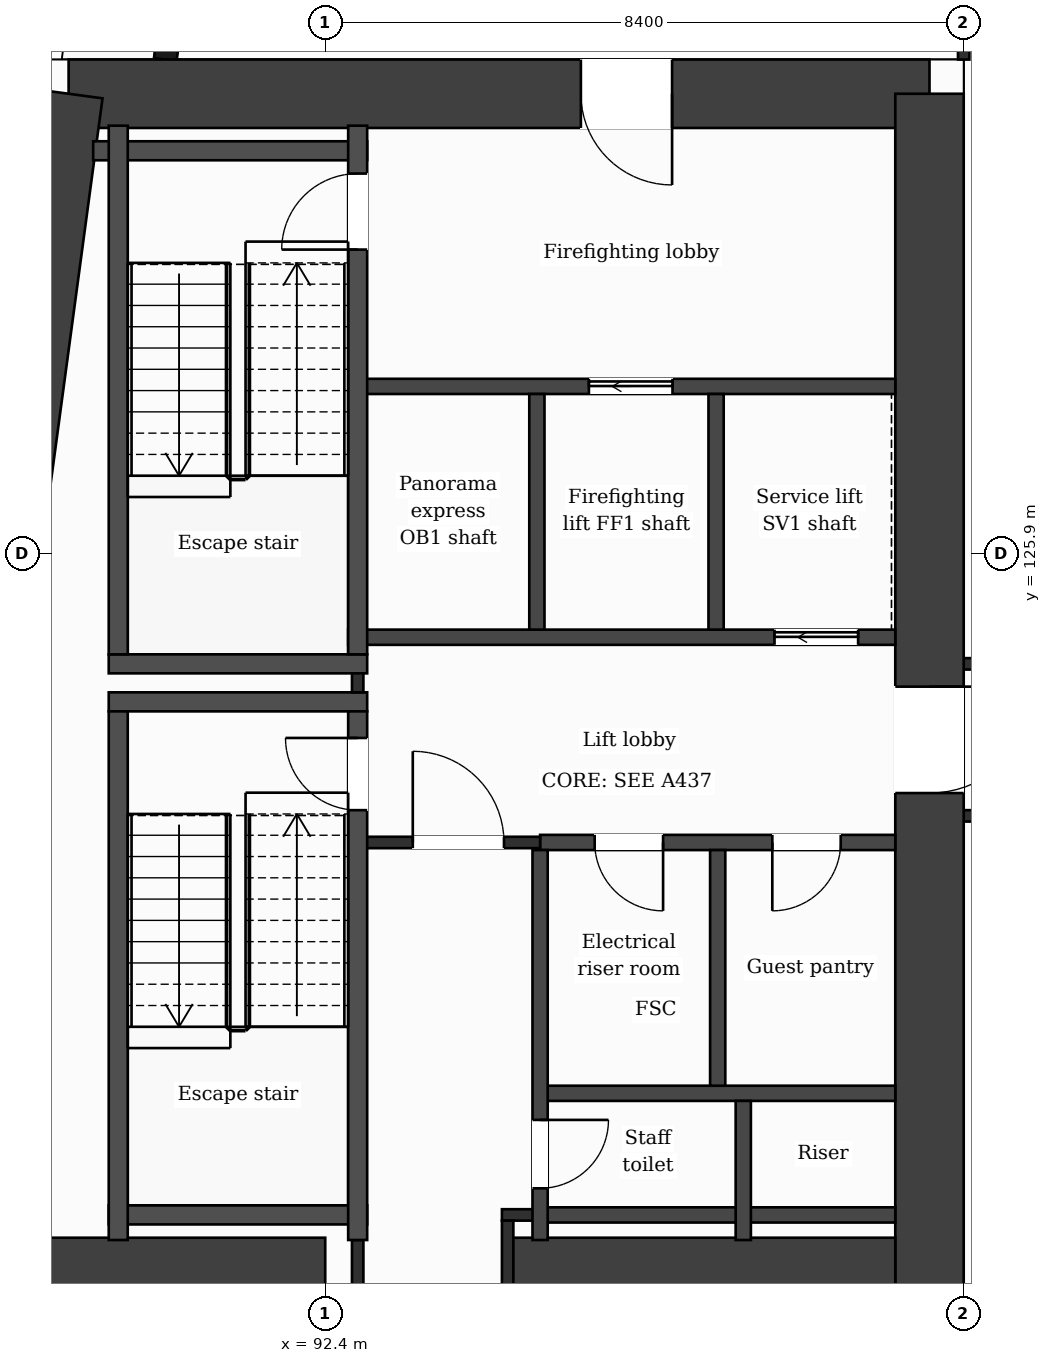
"""IFC4 building model, lengths in metres.
Left out: names, types, materials, properties, quantities, classifications, styles, units other than length and angle.
Written with IfcOpenShell. Run it as: python <this file> out.ifc"""

import sys

from ifc_helpers import new_model, si_unit, direction, frame, frame_2d, origin, place, context, subcontext, project, spatial, rectangle, extrude, element, fill, save


model = new_model("IFC4")
c1 = context("Model", 3, precision=1e-05, world=origin(), true_north=direction((0.0, 1.0)))
c2 = subcontext(c1, "Body", "Model", "MODEL_VIEW")
j1 = project(units=[si_unit("LENGTHUNIT", "METRE"), si_unit("PLANEANGLEUNIT", "RADIAN")], contexts=[c1])
p1 = place(None, origin())
s1 = spatial("IfcSite", under=j1, at=p1, CompositionType="ELEMENT")
p2 = place(p1, origin())
s2 = spatial("IfcBuilding", under=s1, at=p2, CompositionType="ELEMENT")
p3 = place(p2, frame((0.0, 0.0, 155.2)))
s3 = spatial("IfcBuildingStorey", under=s2, at=p3, CompositionType="ELEMENT", Elevation=155.2)
p4 = place(p3, frame((89.024, 131.95, 0.0), z_axis=(0.0, 0.0, 1.0), x_axis=(1.0, 0.0, 0.0)))
e1 = element("IfcWall", 1, at=p4, inside=s3, PredefinedType="SHEAR", context=c2, shape_type="SweptSolid", body=[
    extrude(rectangle(XDim=11.326, YDim=0.9, at=frame_2d((5.663, 0.0))), origin(), (0.0, 0.0, 1.0), 3.7),
])
p5 = place(p4, frame((6.739, 0.0, 0.0)))
e2 = element("IfcOpeningElement", 2, at=p5, cuts=e1, PredefinedType="OPENING", context=c2, shape_type="SweptSolid", body=[
    extrude(rectangle(XDim=1.2, YDim=2.1, at=frame_2d((0.6, 1.05))), frame((0.0, 0.46, 0.0), z_axis=(0.0, -1.0, 0.0), x_axis=(1.0, 0.0, 0.0)), (0.0, 0.0, 1.0), 0.92),
])
p6 = place(p3, frame((100.35, 131.95, 0.0), z_axis=(0.0, 0.0, 1.0), x_axis=(0.0, -1.0, 0.0)))
e3 = element("IfcWall", 3, at=p6, inside=s3, PredefinedType="SHEAR", context=c2, shape_type="SweptSolid", body=[
    extrude(rectangle(XDim=21.1, YDim=0.9, at=frame_2d((10.55, 0.0))), origin(), (0.0, 0.0, 1.0), 3.7),
])
p7 = place(p6, frame((7.8, 0.0, 0.0)))
e4 = element("IfcOpeningElement", 4, at=p7, cuts=e3, PredefinedType="OPENING", context=c2, shape_type="SweptSolid", body=[
    extrude(rectangle(XDim=1.4, YDim=2.1, at=frame_2d((0.7, 1.05))), frame((0.0, 0.46, 0.0), z_axis=(0.0, -1.0, 0.0), x_axis=(1.0, 0.0, 0.0)), (0.0, 0.0, 1.0), 0.92),
])
p8 = place(p3, frame((86.184, 110.85, 0.0), z_axis=(0.0, 0.0, 1.0), x_axis=(0.133410495943, 0.991060865725, 0.0)))
e5 = element("IfcWall", 5, at=p8, inside=s3, PredefinedType="SHEAR", context=c2, shape_type="SweptSolid", body=[
    extrude(rectangle(XDim=21.29, YDim=0.9, at=frame_2d((10.645, 0.0))), origin(), (0.0, 0.0, 1.0), 3.7),
])
p9 = place(p3, frame((87.323, 116.45, 0.0), z_axis=(0.0, 0.0, 1.0), x_axis=(1.0, 0.0, 0.0)))
e6 = element("IfcWall", 6, at=p9, inside=s3, PredefinedType="SHEAR", context=c2, shape_type="SweptSolid", body=[
    extrude(rectangle(XDim=5.077, YDim=0.9, at=frame_2d((2.539, 0.0))), origin(), (0.0, 0.0, 1.0), 3.7),
])
p10 = place(p3, frame((94.8, 116.45, 0.0), z_axis=(0.0, 0.0, 1.0), x_axis=(1.0, 0.0, 0.0)))
e7 = element("IfcWall", 7, at=p10, inside=s3, PredefinedType="SHEAR", context=c2, shape_type="SweptSolid", body=[
    extrude(rectangle(XDim=5.1, YDim=0.9, at=frame_2d((2.55, 0.0))), origin(), (0.0, 0.0, 1.0), 3.7),
])
p11 = place(p3, frame((91.177, 138.95, 0.0), z_axis=(0.0, 0.0, 1.0), x_axis=(-0.133426664613, -0.991058689065, 0.0)))
e8 = element("IfcWall", 8, at=p11, inside=s3, PredefinedType="SOLIDWALL", context=c2, shape_type="SweptSolid", body=[
    extrude(rectangle(XDim=6.609, YDim=0.3, at=frame_2d((3.305, 0.0))), origin(), (0.0, 0.0, 1.0), 3.38),
])
p12 = place(p11, frame((1.039, 0.0, 0.9)))
e9 = element("IfcOpeningElement", 9, at=p12, cuts=e8, PredefinedType="OPENING", context=c2, shape_type="SweptSolid", body=[
    extrude(rectangle(XDim=1.2, YDim=2.1, at=frame_2d((0.6, 1.05))), frame((0.0, 0.16, 0.0), z_axis=(0.0, -1.0, 0.0), x_axis=(1.0, 0.0, 0.0)), (0.0, 0.0, 1.0), 0.32),
])
p13 = place(p11, frame((4.294, 0.0, 0.0)))
e10 = element("IfcOpeningElement", 10, at=p13, cuts=e8, PredefinedType="OPENING", context=c2, shape_type="SweptSolid", body=[
    extrude(rectangle(XDim=1.2, YDim=2.4, at=frame_2d((0.6, 1.2))), frame((0.0, 0.16, 0.0), z_axis=(0.0, -1.0, 0.0), x_axis=(1.0, 0.0, 0.0)), (0.0, 0.0, 1.0), 0.32),
])
p14 = place(p3, frame((95.227, 117.2, 0.0), z_axis=(0.0, 0.0, 1.0), x_axis=(1.0, 0.0, 0.0)))
e11 = element("IfcWall", 11, at=p14, inside=s3, PredefinedType="PARTITIONING", context=c2, shape_type="SweptSolid", body=[
    extrude(rectangle(XDim=4.673, YDim=0.2, at=frame_2d((2.336, 0.0))), origin(), (0.0, 0.0, 1.0), 3.38),
])
p15 = place(p3, frame((94.725, 117.2, 0.0), z_axis=(0.0, 0.0, 1.0), x_axis=(1.0, 0.0, 0.0)))
e12 = element("IfcWall", 12, at=p15, inside=s3, PredefinedType="PARTITIONING", context=c2, shape_type="SweptSolid", body=[
    extrude(rectangle(XDim=0.502, YDim=0.15, at=frame_2d((0.251, 0.0))), origin(), (0.0, 0.0, 1.0), 3.38),
])
p16 = place(p3, frame((89.552, 117.2, 0.0), z_axis=(0.0, 0.0, 1.0), x_axis=(1.0, 0.0, 0.0)))
e13 = element("IfcWall", 13, at=p16, inside=s3, PredefinedType="PARTITIONING", context=c2, shape_type="SweptSolid", body=[
    extrude(rectangle(XDim=3.4, YDim=0.25, at=frame_2d((1.7, 0.0))), origin(), (0.0, 0.0, 1.0), 3.38),
])
p17 = place(p3, frame((95.227, 118.8, 0.0), z_axis=(0.0, 0.0, 1.0), x_axis=(1.0, 0.0, 0.0)))
e14 = element("IfcWall", 14, at=p17, inside=s3, PredefinedType="PARTITIONING", context=c2, shape_type="SweptSolid", body=[
    extrude(rectangle(XDim=4.673, YDim=0.2, at=frame_2d((2.336, 0.0))), origin(), (0.0, 0.0, 1.0), 3.38),
])
p18 = place(p3, frame((95.227, 122.1, 0.0), z_axis=(0.0, 0.0, 1.0), x_axis=(1.0, 0.0, 0.0)))
e15 = element("IfcWall", 15, at=p18, inside=s3, PredefinedType="PARTITIONING", context=c2, shape_type="SweptSolid", body=[
    extrude(rectangle(XDim=4.673, YDim=0.2, at=frame_2d((2.336, 0.0))), origin(), (0.0, 0.0, 1.0), 3.38),
])
p19 = place(p18, frame((0.718, 0.0, 0.0)))
e16 = element("IfcOpeningElement", 16, at=p19, cuts=e15, PredefinedType="OPENING", context=c2, shape_type="SweptSolid", body=[
    extrude(rectangle(XDim=0.9, YDim=2.1, at=frame_2d((0.45, 1.05))), frame((0.0, 0.11, 0.0), z_axis=(0.0, -1.0, 0.0), x_axis=(1.0, 0.0, 0.0)), (0.0, 0.0, 1.0), 0.22),
])
p20 = place(p18, frame((3.055, 0.0, 0.0)))
e17 = element("IfcOpeningElement", 17, at=p20, cuts=e15, PredefinedType="OPENING", context=c2, shape_type="SweptSolid", body=[
    extrude(rectangle(XDim=0.9, YDim=2.1, at=frame_2d((0.45, 1.05))), frame((0.0, 0.11, 0.0), z_axis=(0.0, -1.0, 0.0), x_axis=(1.0, 0.0, 0.0)), (0.0, 0.0, 1.0), 0.22),
])
p21 = place(p3, frame((92.827, 122.1, 0.0), z_axis=(0.0, 0.0, 1.0), x_axis=(1.0, 0.0, 0.0)))
e18 = element("IfcWall", 18, at=p21, inside=s3, PredefinedType="PARTITIONING", context=c2, shape_type="SweptSolid", body=[
    extrude(rectangle(XDim=2.4, YDim=0.15, at=frame_2d((1.2, 0.0))), origin(), (0.0, 0.0, 1.0), 3.38),
])
p22 = place(p21, frame((0.725, 0.0, 0.0)))
e19 = element("IfcOpeningElement", 19, at=p22, cuts=e18, PredefinedType="OPENING", context=c2, shape_type="SweptSolid", body=[
    extrude(rectangle(XDim=1.2, YDim=2.1, at=frame_2d((0.6, 1.05))), frame((0.0, 0.085, 0.0), z_axis=(0.0, -1.0, 0.0), x_axis=(1.0, 0.0, 0.0)), (0.0, 0.0, 1.0), 0.17),
])
p23 = place(p3, frame((100.8, 122.45, 0.0), z_axis=(0.0, 0.0, 1.0), x_axis=(1.0, 0.0, 0.0)))
e20 = element("IfcWall", 20, at=p23, inside=s3, PredefinedType="PARTITIONING", context=c2, shape_type="SweptSolid", body=[
    extrude(rectangle(XDim=25.2, YDim=0.15, at=frame_2d((12.6, 0.0))), origin(), (0.0, 0.0, 1.0), 3.38),
])
for number, where, z_axis, x_axis in (
    (21, (89.552, 123.95, 0.0), (0.0, 0.0, 1.0), (1.0, 0.0, 0.0)),
    (22, (89.552, 124.45, 0.0), (0.0, 0.0, 1.0), (1.0, 0.0, 0.0)),
):
    element("IfcWall", number, at=place(p3, frame(where, z_axis=z_axis, x_axis=x_axis)), inside=s3, PredefinedType="PARTITIONING", context=c2, shape_type="SweptSolid", body=[
        extrude(rectangle(XDim=3.4, YDim=0.25, at=frame_2d((1.7, 0.0))), origin(), (0.0, 0.0, 1.0), 3.38),
    ])
p24 = place(p3, frame((100.8, 124.45, 0.0), z_axis=(0.0, 0.0, 1.0), x_axis=(1.0, 0.0, 0.0)))
e23 = element("IfcWall", 23, at=p24, inside=s3, PredefinedType="PARTITIONING", context=c2, shape_type="SweptSolid", body=[
    extrude(rectangle(XDim=25.2, YDim=0.15, at=frame_2d((12.6, 0.0))), origin(), (0.0, 0.0, 1.0), 3.38),
])
p25 = place(p24, frame((3.03, 0.0, 0.0)))
e24 = element("IfcOpeningElement", 24, at=p25, cuts=e23, PredefinedType="OPENING", context=c2, shape_type="SweptSolid", body=[
    extrude(rectangle(XDim=1.0, YDim=2.1, at=frame_2d((0.5, 1.05))), frame((0.0, 0.085, 0.0), z_axis=(0.0, -1.0, 0.0), x_axis=(1.0, 0.0, 0.0)), (0.0, 0.0, 1.0), 0.17),
])
p26 = place(p24, frame((12.77, 0.0, 0.0)))
e25 = element("IfcOpeningElement", 25, at=p26, cuts=e23, PredefinedType="OPENING", context=c2, shape_type="SweptSolid", body=[
    extrude(rectangle(XDim=1.0, YDim=2.1, at=frame_2d((0.5, 1.05))), frame((0.0, 0.085, 0.0), z_axis=(0.0, -1.0, 0.0), x_axis=(1.0, 0.0, 0.0)), (0.0, 0.0, 1.0), 0.17),
])
p27 = place(p24, frame((17.67, 0.0, 0.0)))
e26 = element("IfcOpeningElement", 26, at=p27, cuts=e23, PredefinedType="OPENING", context=c2, shape_type="SweptSolid", body=[
    extrude(rectangle(XDim=1.0, YDim=2.1, at=frame_2d((0.5, 1.05))), frame((0.0, 0.085, 0.0), z_axis=(0.0, -1.0, 0.0), x_axis=(1.0, 0.0, 0.0)), (0.0, 0.0, 1.0), 0.17),
])
p28 = place(p24, frame((22.35, 0.0, 0.0)))
e27 = element("IfcOpeningElement", 27, at=p28, cuts=e23, PredefinedType="OPENING", context=c2, shape_type="SweptSolid", body=[
    extrude(rectangle(XDim=1.0, YDim=2.1, at=frame_2d((0.5, 1.05))), frame((0.0, 0.085, 0.0), z_axis=(0.0, -1.0, 0.0), x_axis=(1.0, 0.0, 0.0)), (0.0, 0.0, 1.0), 0.17),
])
p29 = place(p3, frame((92.702, 124.8, 0.0), z_axis=(0.0, 0.0, 1.0), x_axis=(1.0, 0.0, 0.0)))
e28 = element("IfcWall", 28, at=p29, inside=s3, PredefinedType="PARTITIONING", context=c2, shape_type="SweptSolid", body=[
    extrude(rectangle(XDim=7.198, YDim=0.2, at=frame_2d((3.599, 0.0))), origin(), (0.0, 0.0, 1.0), 3.38),
])
p30 = place(p29, frame((5.609, 0.0, 0.0)))
e29 = element("IfcOpeningElement", 29, at=p30, cuts=e28, PredefinedType="OPENING", context=c2, shape_type="SweptSolid", body=[
    extrude(rectangle(XDim=1.1, YDim=2.1, at=frame_2d((0.55, 1.05))), frame((0.0, 0.11, 0.0), z_axis=(0.0, -1.0, 0.0), x_axis=(1.0, 0.0, 0.0)), (0.0, 0.0, 1.0), 0.22),
])
p31 = place(p3, frame((92.827, 128.1, 0.0), z_axis=(0.0, 0.0, 1.0), x_axis=(1.0, 0.0, 0.0)))
e30 = element("IfcWall", 30, at=p31, inside=s3, PredefinedType="PARTITIONING", context=c2, shape_type="SweptSolid", body=[
    extrude(rectangle(XDim=7.073, YDim=0.2, at=frame_2d((3.537, 0.0))), origin(), (0.0, 0.0, 1.0), 3.38),
])
p32 = place(p31, frame((3.042, 0.0, 0.0)))
e31 = element("IfcOpeningElement", 31, at=p32, cuts=e30, PredefinedType="OPENING", context=c2, shape_type="SweptSolid", body=[
    extrude(rectangle(XDim=1.1, YDim=2.1, at=frame_2d((0.55, 1.05))), frame((0.0, 0.11, 0.0), z_axis=(0.0, -1.0, 0.0), x_axis=(1.0, 0.0, 0.0)), (0.0, 0.0, 1.0), 0.22),
])
p33 = place(p3, frame((89.347, 131.2, 0.0), z_axis=(0.0, 0.0, 1.0), x_axis=(1.0, 0.0, 0.0)))
e32 = element("IfcWall", 32, at=p33, inside=s3, PredefinedType="PARTITIONING", context=c2, shape_type="SweptSolid", body=[
    extrude(rectangle(XDim=3.604, YDim=0.25, at=frame_2d((1.802, 0.0))), origin(), (0.0, 0.0, 1.0), 3.38),
])
p34 = place(p3, frame((89.677, 116.87, 0.0), z_axis=(0.0, 0.0, 1.0), x_axis=(0.0, 1.0, 0.0)))
e33 = element("IfcWall", 33, at=p34, inside=s3, PredefinedType="PARTITIONING", context=c2, shape_type="SweptSolid", body=[
    extrude(rectangle(XDim=6.955, YDim=0.25, at=frame_2d((3.478, 0.0))), origin(), (0.0, 0.0, 1.0), 3.38),
])
p35 = place(p3, frame((89.677, 124.575, 0.0), z_axis=(0.0, 0.0, 1.0), x_axis=(0.0, 1.0, 0.0)))
e34 = element("IfcWall", 34, at=p35, inside=s3, PredefinedType="PARTITIONING", context=c2, shape_type="SweptSolid", body=[
    extrude(rectangle(XDim=6.955, YDim=0.25, at=frame_2d((3.478, 0.0))), origin(), (0.0, 0.0, 1.0), 3.38),
])
p36 = place(p3, frame((92.827, 116.0, 0.0), z_axis=(0.0, 0.0, 1.0), x_axis=(0.0, 1.0, 0.0)))
e35 = element("IfcWall", 35, at=p36, inside=s3, PredefinedType="PARTITIONING", context=c2, shape_type="SweptSolid", body=[
    extrude(rectangle(XDim=0.87, YDim=0.15, at=frame_2d((0.435, 0.0))), origin(), (0.0, 0.0, 1.0), 3.38),
])
p37 = place(p3, frame((92.827, 124.075, 0.0), z_axis=(0.0, 0.0, 1.0), x_axis=(0.0, 1.0, 0.0)))
e36 = element("IfcWall", 36, at=p37, inside=s3, PredefinedType="PARTITIONING", context=c2, shape_type="SweptSolid", body=[
    extrude(rectangle(XDim=0.25, YDim=0.15, at=frame_2d((0.125, 0.0))), origin(), (0.0, 0.0, 1.0), 3.38),
])
p38 = place(p3, frame((92.827, 116.87, 0.0), z_axis=(0.0, 0.0, 1.0), x_axis=(0.0, 1.0, 0.0)))
e37 = element("IfcWall", 37, at=p38, inside=s3, PredefinedType="PARTITIONING", context=c2, shape_type="SweptSolid", body=[
    extrude(rectangle(XDim=6.955, YDim=0.25, at=frame_2d((3.478, 0.0))), origin(), (0.0, 0.0, 1.0), 3.38),
])
p39 = place(p38, frame((5.655, 0.0, 0.0)))
e38 = element("IfcOpeningElement", 38, at=p39, cuts=e37, PredefinedType="OPENING", context=c2, shape_type="SweptSolid", body=[
    extrude(rectangle(XDim=0.95, YDim=2.1, at=frame_2d((0.475, 1.05))), frame((0.0, 0.135, 0.0), z_axis=(0.0, -1.0, 0.0), x_axis=(1.0, 0.0, 0.0)), (0.0, 0.0, 1.0), 0.27),
])
p40 = place(p3, frame((92.827, 124.575, 0.0), z_axis=(0.0, 0.0, 1.0), x_axis=(0.0, 1.0, 0.0)))
e39 = element("IfcWall", 39, at=p40, inside=s3, PredefinedType="PARTITIONING", context=c2, shape_type="SweptSolid", body=[
    extrude(rectangle(XDim=6.955, YDim=0.25, at=frame_2d((3.478, 0.0))), origin(), (0.0, 0.0, 1.0), 3.38),
])
p41 = place(p40, frame((5.325, 0.0, 0.0)))
e40 = element("IfcOpeningElement", 40, at=p41, cuts=e39, PredefinedType="OPENING", context=c2, shape_type="SweptSolid", body=[
    extrude(rectangle(XDim=1.0, YDim=2.1, at=frame_2d((0.5, 1.05))), frame((0.0, 0.135, 0.0), z_axis=(0.0, -1.0, 0.0), x_axis=(1.0, 0.0, 0.0)), (0.0, 0.0, 1.0), 0.27),
])
p42 = place(p3, frame((94.8, 116.0, 0.0), z_axis=(0.0, 0.0, 1.0), x_axis=(0.0, 1.0, 0.0)))
e41 = element("IfcWall", 41, at=p42, inside=s3, PredefinedType="PARTITIONING", context=c2, shape_type="SweptSolid", body=[
    extrude(rectangle(XDim=1.125, YDim=0.15, at=frame_2d((0.562, 0.0))), origin(), (0.0, 0.0, 1.0), 3.38),
])
p43 = place(p3, frame((95.185, 124.9, 0.0), z_axis=(0.0, 0.0, 1.0), x_axis=(0.0, 1.0, 0.0)))
e42 = element("IfcWall", 42, at=p43, inside=s3, PredefinedType="PARTITIONING", context=c2, shape_type="SweptSolid", body=[
    extrude(rectangle(XDim=3.1, YDim=0.2, at=frame_2d((1.55, 0.0))), origin(), (0.0, 0.0, 1.0), 3.38),
])
p44 = place(p3, frame((95.227, 116.87, 0.0), z_axis=(0.0, 0.0, 1.0), x_axis=(0.0, 1.0, 0.0)))
e43 = element("IfcWall", 43, at=p44, inside=s3, PredefinedType="PARTITIONING", context=c2, shape_type="SweptSolid", body=[
    extrude(rectangle(XDim=5.13, YDim=0.2, at=frame_2d((2.565, 0.0))), origin(), (0.0, 0.0, 1.0), 3.38),
])
p45 = place(p44, frame((0.68, 0.0, 0.0)))
e44 = element("IfcOpeningElement", 44, at=p45, cuts=e43, PredefinedType="OPENING", context=c2, shape_type="SweptSolid", body=[
    extrude(rectangle(XDim=0.9, YDim=2.1, at=frame_2d((0.45, 1.05))), frame((0.0, 0.11, 0.0), z_axis=(0.0, -1.0, 0.0), x_axis=(1.0, 0.0, 0.0)), (0.0, 0.0, 1.0), 0.22),
])
for number, where, z_axis, x_axis in (
    (45, (97.542, 124.9, 0.0), (0.0, 0.0, 1.0), (0.0, 1.0, 0.0)),
    (46, (97.563, 118.9, 0.0), (0.0, 0.0, 1.0), (0.0, 1.0, 0.0)),
):
    element("IfcWall", number, at=place(p3, frame(where, z_axis=z_axis, x_axis=x_axis)), inside=s3, PredefinedType="PARTITIONING", context=c2, shape_type="SweptSolid", body=[
        extrude(rectangle(XDim=3.1, YDim=0.2, at=frame_2d((1.55, 0.0))), origin(), (0.0, 0.0, 1.0), 3.38),
    ])
p46 = place(p3, frame((97.9, 116.87, 0.0), z_axis=(0.0, 0.0, 1.0), x_axis=(0.0, 1.0, 0.0)))
e47 = element("IfcWall", 47, at=p46, inside=s3, PredefinedType="PARTITIONING", context=c2, shape_type="SweptSolid", body=[
    extrude(rectangle(XDim=1.83, YDim=0.2, at=frame_2d((0.915, 0.0))), origin(), (0.0, 0.0, 1.0), 3.38),
])
p47 = place(p3, frame((100.8, 132.4, 0.0), z_axis=(0.0, 0.0, 1.0), x_axis=(0.0, 1.0, 0.0)))
e48 = element("IfcWall", 48, at=p47, inside=s3, PredefinedType="PARTITIONING", context=c2, shape_type="SweptSolid", body=[
    extrude(rectangle(XDim=1.325, YDim=0.15, at=frame_2d((0.663, 0.0))), origin(), (0.0, 0.0, 1.0), 3.38),
])
p48 = place(p22, origin())
e49 = element("IfcDoor", 49, at=p48, inside=s3, OperationType="SINGLE_SWING_LEFT", PredefinedType="DOOR", context=c2, shape_type="SweptSolid", body=[
    extrude(rectangle(XDim=1.2, YDim=2.1, at=frame_2d((0.6, 1.05))), frame((0.0, 0.025, 0.0), z_axis=(0.0, -1.0, 0.0), x_axis=(1.0, 0.0, 0.0)), (0.0, 0.0, 1.0), 0.05),
])
fill(e19, e49)
p49 = place(p32, origin())
e50 = element("IfcDoor", 50, at=p49, inside=s3, OperationType="SLIDING_TO_LEFT", PredefinedType="DOOR", context=c2, shape_type="SweptSolid", body=[
    extrude(rectangle(XDim=1.1, YDim=2.1, at=frame_2d((0.55, 1.05))), frame((0.0, 0.025, 0.0), z_axis=(0.0, -1.0, 0.0), x_axis=(1.0, 0.0, 0.0)), (0.0, 0.0, 1.0), 0.05),
])
fill(e31, e50)
p50 = place(p30, origin())
e51 = element("IfcDoor", 51, at=p50, inside=s3, OperationType="SLIDING_TO_LEFT", PredefinedType="DOOR", context=c2, shape_type="SweptSolid", body=[
    extrude(rectangle(XDim=1.1, YDim=2.1, at=frame_2d((0.55, 1.05))), frame((0.0, 0.025, 0.0), z_axis=(0.0, -1.0, 0.0), x_axis=(1.0, 0.0, 0.0)), (0.0, 0.0, 1.0), 0.05),
])
fill(e29, e51)
p51 = place(p19, origin())
e52 = element("IfcDoor", 52, at=p51, inside=s3, OperationType="SINGLE_SWING_RIGHT", PredefinedType="DOOR", context=c2, shape_type="SweptSolid", body=[
    extrude(rectangle(XDim=0.9, YDim=2.1, at=frame_2d((0.45, 1.05))), frame((0.0, 0.025, 0.0), z_axis=(0.0, -1.0, 0.0), x_axis=(1.0, 0.0, 0.0)), (0.0, 0.0, 1.0), 0.05),
])
fill(e16, e52)
p52 = place(p20, origin())
e53 = element("IfcDoor", 53, at=p52, inside=s3, OperationType="SINGLE_SWING_LEFT", PredefinedType="DOOR", context=c2, shape_type="SweptSolid", body=[
    extrude(rectangle(XDim=0.9, YDim=2.1, at=frame_2d((0.45, 1.05))), frame((0.0, 0.025, 0.0), z_axis=(0.0, -1.0, 0.0), x_axis=(1.0, 0.0, 0.0)), (0.0, 0.0, 1.0), 0.05),
])
fill(e17, e53)
p53 = place(p39, origin())
e54 = element("IfcDoor", 54, at=p53, inside=s3, OperationType="SINGLE_SWING_RIGHT", PredefinedType="DOOR", context=c2, shape_type="SweptSolid", body=[
    extrude(rectangle(XDim=0.95, YDim=2.1, at=frame_2d((0.475, 1.05))), frame((0.0, 0.025, 0.0), z_axis=(0.0, -1.0, 0.0), x_axis=(1.0, 0.0, 0.0)), (0.0, 0.0, 1.0), 0.05),
])
fill(e38, e54)
p54 = place(p41, origin())
e55 = element("IfcDoor", 55, at=p54, inside=s3, OperationType="SINGLE_SWING_LEFT", PredefinedType="DOOR", context=c2, shape_type="SweptSolid", body=[
    extrude(rectangle(XDim=1.0, YDim=2.1, at=frame_2d((0.5, 1.05))), frame((0.0, 0.025, 0.0), z_axis=(0.0, -1.0, 0.0), x_axis=(1.0, 0.0, 0.0)), (0.0, 0.0, 1.0), 0.05),
])
fill(e40, e55)
p55 = place(p45, origin())
e56 = element("IfcDoor", 56, at=p55, inside=s3, OperationType="SINGLE_SWING_RIGHT", PredefinedType="DOOR", context=c2, shape_type="SweptSolid", body=[
    extrude(rectangle(XDim=0.9, YDim=2.1, at=frame_2d((0.45, 1.05))), frame((0.0, 0.025, 0.0), z_axis=(0.0, -1.0, 0.0), x_axis=(1.0, 0.0, 0.0)), (0.0, 0.0, 1.0), 0.05),
])
fill(e44, e56)
p56 = place(p5, origin())
e57 = element("IfcDoor", 57, at=p56, inside=s3, OperationType="SINGLE_SWING_RIGHT", PredefinedType="DOOR", context=c2, shape_type="SweptSolid", body=[
    extrude(rectangle(XDim=1.2, YDim=2.1, at=frame_2d((0.6, 1.05))), frame((0.0, 0.025, 0.0), z_axis=(0.0, -1.0, 0.0), x_axis=(1.0, 0.0, 0.0)), (0.0, 0.0, 1.0), 0.05),
])
fill(e2, e57)
p57 = place(p7, origin())
e58 = element("IfcDoor", 58, at=p57, inside=s3, OperationType="SINGLE_SWING_LEFT", PredefinedType="DOOR", context=c2, shape_type="SweptSolid", body=[
    extrude(rectangle(XDim=1.4, YDim=2.1, at=frame_2d((0.7, 1.05))), frame((0.0, 0.025, 0.0), z_axis=(0.0, -1.0, 0.0), x_axis=(1.0, 0.0, 0.0)), (0.0, 0.0, 1.0), 0.05),
])
fill(e4, e58)
save(model, sys.argv[1])
